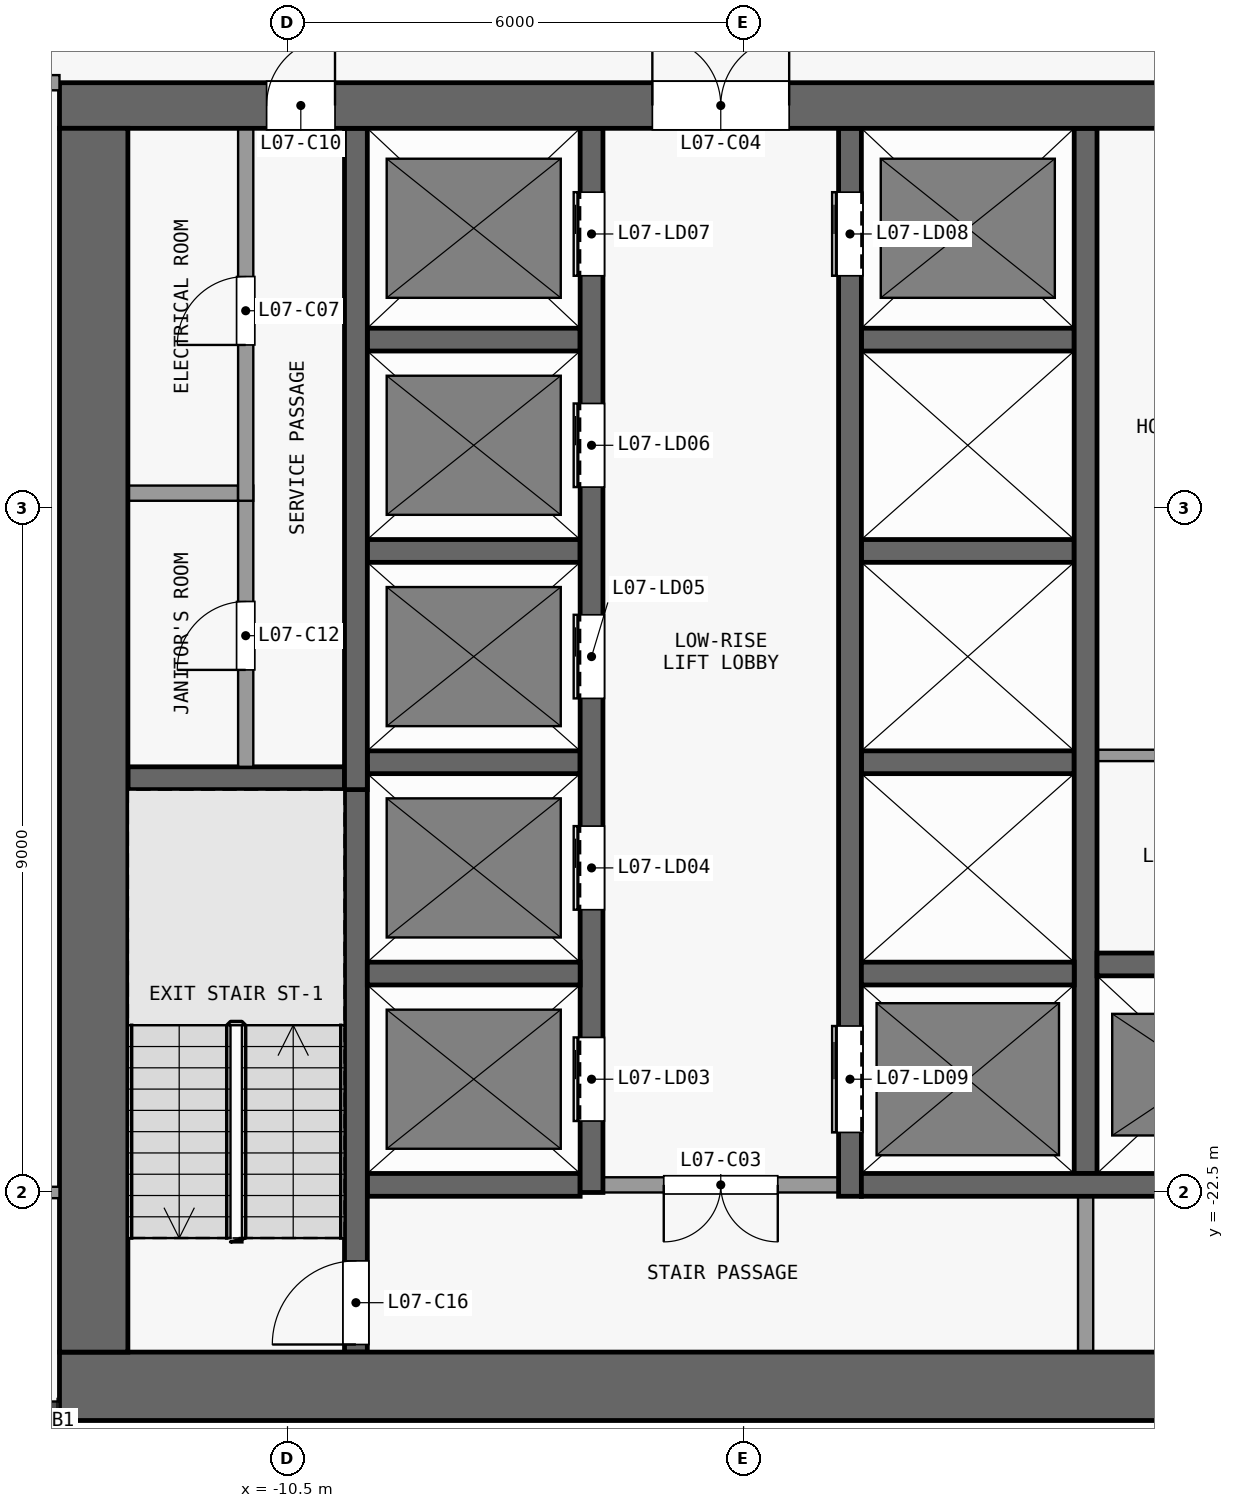
"""IFC4 building model, lengths in metres.
Left out: names, types, materials, properties, quantities, classifications, styles, units other than length and angle.
Written with IfcOpenShell. Run it as: python <this file> out.ifc"""

import sys

from ifc_helpers import new_model, si_unit, direction, frame, frame_2d, origin, place, context, subcontext, project, spatial, rectangle, extrude, element, fill, save


model = new_model("IFC4")
c1 = context("Model", 3, precision=1e-05, world=origin(), true_north=direction((0.0, 1.0)))
c2 = subcontext(c1, "Body", "Model", "MODEL_VIEW")
j1 = project(units=[si_unit("LENGTHUNIT", "METRE"), si_unit("PLANEANGLEUNIT", "RADIAN")], contexts=[c1])
p1 = place(None, origin())
s1 = spatial("IfcSite", under=j1, at=p1, CompositionType="ELEMENT")
p2 = place(p1, origin())
s2 = spatial("IfcBuilding", under=s1, at=p2, CompositionType="ELEMENT")
p3 = place(p2, frame((0.0, 0.0, 36.1)))
s3 = spatial("IfcBuildingStorey", under=s2, at=p3, CompositionType="ELEMENT", Elevation=36.1)
p4 = place(p3, frame((-13.5, -25.05, 0.0), z_axis=(0.0, 0.0, 1.0), x_axis=(1.0, 0.0, 0.0)))
e1 = element("IfcWall", 1, at=p4, inside=s3, PredefinedType="SHEAR", context=c2, shape_type="SweptSolid", body=[
    extrude(rectangle(XDim=27.0, YDim=0.9, at=frame_2d((13.5, 0.0))), origin(), (0.0, 0.0, 1.0), 3.3),
])
p5 = place(p3, frame((-13.5, -8.2, 0.0), z_axis=(0.0, 0.0, 1.0), x_axis=(1.0, 0.0, 0.0)))
e2 = element("IfcWall", 2, at=p5, inside=s3, PredefinedType="SHEAR", context=c2, shape_type="SweptSolid", body=[
    extrude(rectangle(XDim=27.0, YDim=0.6, at=frame_2d((13.5, 0.0))), origin(), (0.0, 0.0, 1.0), 3.3),
])
p6 = place(p5, frame((7.8, 0.0, 0.0)))
e3 = element("IfcOpeningElement", 3, at=p6, cuts=e2, PredefinedType="OPENING", context=c2, shape_type="SweptSolid", body=[
    extrude(rectangle(XDim=1.8, YDim=2.1, at=frame_2d((0.9, 1.05))), frame((0.0, 0.31, 0.0), z_axis=(0.0, -1.0, 0.0), x_axis=(1.0, 0.0, 0.0)), (0.0, 0.0, 1.0), 0.62),
])
p7 = place(p5, frame((17.4, 0.0, 0.0)))
e4 = element("IfcOpeningElement", 4, at=p7, cuts=e2, PredefinedType="OPENING", context=c2, shape_type="SweptSolid", body=[
    extrude(rectangle(XDim=1.8, YDim=2.1, at=frame_2d((0.9, 1.05))), frame((0.0, 0.31, 0.0), z_axis=(0.0, -1.0, 0.0), x_axis=(1.0, 0.0, 0.0)), (0.0, 0.0, 1.0), 0.62),
])
p8 = place(p5, frame((2.725, 0.0, 0.0)))
e5 = element("IfcOpeningElement", 5, at=p8, cuts=e2, PredefinedType="OPENING", context=c2, shape_type="SweptSolid", body=[
    extrude(rectangle(XDim=0.9, YDim=2.1, at=frame_2d((0.45, 1.05))), frame((0.0, 0.31, 0.0), z_axis=(0.0, -1.0, 0.0), x_axis=(1.0, 0.0, 0.0)), (0.0, 0.0, 1.0), 0.62),
])
p9 = place(p5, frame((23.375, 0.0, 0.0)))
e6 = element("IfcOpeningElement", 6, at=p9, cuts=e2, PredefinedType="OPENING", context=c2, shape_type="SweptSolid", body=[
    extrude(rectangle(XDim=0.9, YDim=2.1, at=frame_2d((0.45, 1.05))), frame((0.0, 0.31, 0.0), z_axis=(0.0, -1.0, 0.0), x_axis=(1.0, 0.0, 0.0)), (0.0, 0.0, 1.0), 0.62),
])
p10 = place(p3, frame((-13.05, -24.6, 0.0), z_axis=(0.0, 0.0, 1.0), x_axis=(0.0, 1.0, 0.0)))
e7 = element("IfcWall", 7, at=p10, inside=s3, PredefinedType="SHEAR", context=c2, shape_type="SweptSolid", body=[
    extrude(rectangle(XDim=16.1, YDim=0.9, at=frame_2d((8.05, 0.0))), origin(), (0.0, 0.0, 1.0), 3.3),
])
p11 = place(p3, frame((-9.45, -22.4, 0.0), z_axis=(0.0, 0.0, 1.0), x_axis=(1.0, 0.0, 0.0)))
e8 = element("IfcWall", 8, at=p11, inside=s3, PredefinedType="SHEAR", context=c2, shape_type="SweptSolid", body=[
    extrude(rectangle(XDim=2.8, YDim=0.3, at=frame_2d((1.4, 0.0))), origin(), (0.0, 0.0, 1.0), 3.3),
])
p12 = place(p3, frame((-3.25, -22.4, 0.0), z_axis=(0.0, 0.0, 1.0), x_axis=(-1.0, 0.0, 0.0)))
e9 = element("IfcWall", 9, at=p12, inside=s3, PredefinedType="PARTITIONING", context=c2, shape_type="SweptSolid", body=[
    extrude(rectangle(XDim=3.1, YDim=0.2, at=frame_2d((1.55, 0.0))), origin(), (0.0, 0.0, 1.0), 3.3),
])
p13 = place(p12, frame((0.8, 0.0, 0.0)))
e10 = element("IfcOpeningElement", 10, at=p13, cuts=e9, PredefinedType="OPENING", context=c2, shape_type="SweptSolid", body=[
    extrude(rectangle(XDim=1.5, YDim=2.1, at=frame_2d((0.75, 1.05))), frame((0.0, 0.11, 0.0), z_axis=(0.0, -1.0, 0.0), x_axis=(1.0, 0.0, 0.0)), (0.0, 0.0, 1.0), 0.22),
])
p14 = place(p3, frame((-2.95, -22.4, 0.0), z_axis=(0.0, 0.0, 1.0), x_axis=(1.0, 0.0, 0.0)))
e11 = element("IfcWall", 11, at=p14, inside=s3, PredefinedType="SHEAR", context=c2, shape_type="SweptSolid", body=[
    extrude(rectangle(XDim=6.2, YDim=0.3, at=frame_2d((3.1, 0.0))), origin(), (0.0, 0.0, 1.0), 3.3),
])
for number, where, z_axis, x_axis in (
    (12, (-9.45, -19.62, 0.0), (0.0, 0.0, 1.0), (1.0, 0.0, 0.0)),
    (13, (-2.95, -19.62, 0.0), (0.0, 0.0, 1.0), (1.0, 0.0, 0.0)),
):
    element("IfcWall", number, at=place(p3, frame(where, z_axis=z_axis, x_axis=x_axis)), inside=s3, PredefinedType="SHEAR", context=c2, shape_type="SweptSolid", body=[
        extrude(rectangle(XDim=2.8, YDim=0.3, at=frame_2d((1.4, 0.0))), origin(), (0.0, 0.0, 1.0), 3.3),
    ])
p15 = place(p3, frame((0.15, -19.5, 0.0), z_axis=(0.0, 0.0, 1.0), x_axis=(1.0, 0.0, 0.0)))
e14 = element("IfcWall", 14, at=p15, inside=s3, PredefinedType="SHEAR", context=c2, shape_type="SweptSolid", body=[
    extrude(rectangle(XDim=3.025, YDim=0.3, at=frame_2d((1.513, 0.0))), origin(), (0.0, 0.0, 1.0), 3.3),
])
p16 = place(p3, frame((-12.6, -17.05, 0.0), z_axis=(0.0, 0.0, 1.0), x_axis=(1.0, 0.0, 0.0)))
e15 = element("IfcWall", 15, at=p16, inside=s3, PredefinedType="SHEAR", context=c2, shape_type="SweptSolid", body=[
    extrude(rectangle(XDim=2.85, YDim=0.3, at=frame_2d((1.425, 0.0))), origin(), (0.0, 0.0, 1.0), 3.3),
])
for number, where, z_axis, x_axis in (
    (16, (-9.45, -16.84, 0.0), (0.0, 0.0, 1.0), (1.0, 0.0, 0.0)),
    (17, (-2.95, -16.84, 0.0), (0.0, 0.0, 1.0), (1.0, 0.0, 0.0)),
):
    element("IfcWall", number, at=place(p3, frame(where, z_axis=z_axis, x_axis=x_axis)), inside=s3, PredefinedType="SHEAR", context=c2, shape_type="SweptSolid", body=[
        extrude(rectangle(XDim=2.8, YDim=0.3, at=frame_2d((1.4, 0.0))), origin(), (0.0, 0.0, 1.0), 3.3),
    ])
p17 = place(p3, frame((0.15, -16.75, 0.0), z_axis=(0.0, 0.0, 1.0), x_axis=(1.0, 0.0, 0.0)))
e18 = element("IfcWall", 18, at=p17, inside=s3, PredefinedType="PARTITIONING", context=c2, shape_type="SweptSolid", body=[
    extrude(rectangle(XDim=2.875, YDim=0.15, at=frame_2d((1.438, 0.0))), origin(), (0.0, 0.0, 1.0), 3.3),
])
for number, where, z_axis, x_axis in (
    (19, (-9.45, -14.06, 0.0), (0.0, 0.0, 1.0), (1.0, 0.0, 0.0)),
    (20, (-2.95, -14.06, 0.0), (0.0, 0.0, 1.0), (1.0, 0.0, 0.0)),
):
    element("IfcWall", number, at=place(p3, frame(where, z_axis=z_axis, x_axis=x_axis)), inside=s3, PredefinedType="SHEAR", context=c2, shape_type="SweptSolid", body=[
        extrude(rectangle(XDim=2.8, YDim=0.3, at=frame_2d((1.4, 0.0))), origin(), (0.0, 0.0, 1.0), 3.3),
    ])
p18 = place(p3, frame((-12.6, -13.3, 0.0), z_axis=(0.0, 0.0, 1.0), x_axis=(1.0, 0.0, 0.0)))
e21 = element("IfcWall", 21, at=p18, inside=s3, PredefinedType="PARTITIONING", context=c2, shape_type="SweptSolid", body=[
    extrude(rectangle(XDim=1.45, YDim=0.2, at=frame_2d((0.725, 0.0))), origin(), (0.0, 0.0, 1.0), 3.3),
])
for number, where, z_axis, x_axis in (
    (22, (-9.45, -11.28, 0.0), (0.0, 0.0, 1.0), (1.0, 0.0, 0.0)),
    (23, (-2.95, -11.28, 0.0), (0.0, 0.0, 1.0), (1.0, 0.0, 0.0)),
):
    element("IfcWall", number, at=place(p3, frame(where, z_axis=z_axis, x_axis=x_axis)), inside=s3, PredefinedType="SHEAR", context=c2, shape_type="SweptSolid", body=[
        extrude(rectangle(XDim=2.8, YDim=0.3, at=frame_2d((1.4, 0.0))), origin(), (0.0, 0.0, 1.0), 3.3),
    ])
p19 = place(p3, frame((-11.05, -16.9, 0.0), z_axis=(0.0, 0.0, 1.0), x_axis=(0.0, 1.0, 0.0)))
e24 = element("IfcWall", 24, at=p19, inside=s3, PredefinedType="PARTITIONING", context=c2, shape_type="SweptSolid", body=[
    extrude(rectangle(XDim=3.7, YDim=0.2, at=frame_2d((1.85, 0.0))), origin(), (0.0, 0.0, 1.0), 3.3),
])
p20 = place(p19, frame((1.275, 0.0, 0.0)))
e25 = element("IfcOpeningElement", 25, at=p20, cuts=e24, PredefinedType="OPENING", context=c2, shape_type="SweptSolid", body=[
    extrude(rectangle(XDim=0.9, YDim=2.1, at=frame_2d((0.45, 1.05))), frame((0.0, 0.11, 0.0), z_axis=(0.0, -1.0, 0.0), x_axis=(1.0, 0.0, 0.0)), (0.0, 0.0, 1.0), 0.22),
])
p21 = place(p3, frame((-11.05, -13.4, 0.0), z_axis=(0.0, 0.0, 1.0), x_axis=(0.0, 1.0, 0.0)))
e26 = element("IfcWall", 26, at=p21, inside=s3, PredefinedType="PARTITIONING", context=c2, shape_type="SweptSolid", body=[
    extrude(rectangle(XDim=4.9, YDim=0.2, at=frame_2d((2.45, 0.0))), origin(), (0.0, 0.0, 1.0), 3.3),
])
p22 = place(p21, frame((2.05, 0.0, 0.0)))
e27 = element("IfcOpeningElement", 27, at=p22, cuts=e26, PredefinedType="OPENING", context=c2, shape_type="SweptSolid", body=[
    extrude(rectangle(XDim=0.9, YDim=2.1, at=frame_2d((0.45, 1.05))), frame((0.0, 0.11, 0.0), z_axis=(0.0, -1.0, 0.0), x_axis=(1.0, 0.0, 0.0)), (0.0, 0.0, 1.0), 0.22),
])
p23 = place(p3, frame((-9.6, -24.6, 0.0), z_axis=(0.0, 0.0, 1.0), x_axis=(0.0, 1.0, 0.0)))
e28 = element("IfcWall", 28, at=p23, inside=s3, PredefinedType="SHEAR", context=c2, shape_type="SweptSolid", body=[
    extrude(rectangle(XDim=7.7, YDim=0.3, at=frame_2d((3.85, 0.0))), origin(), (0.0, 0.0, 1.0), 3.3),
])
p24 = place(p23, frame((0.1, 0.0, 0.0)))
e29 = element("IfcOpeningElement", 29, at=p24, cuts=e28, PredefinedType="OPENING", context=c2, shape_type="SweptSolid", body=[
    extrude(rectangle(XDim=1.1, YDim=2.1, at=frame_2d((0.55, 1.05))), frame((0.0, 0.16, 0.0), z_axis=(0.0, -1.0, 0.0), x_axis=(1.0, 0.0, 0.0)), (0.0, 0.0, 1.0), 0.32),
])
p25 = place(p3, frame((-9.6, -17.2, 0.0), z_axis=(0.0, 0.0, 1.0), x_axis=(0.0, 1.0, 0.0)))
e30 = element("IfcWall", 30, at=p25, inside=s3, PredefinedType="SHEAR", context=c2, shape_type="SweptSolid", body=[
    extrude(rectangle(XDim=8.7, YDim=0.3, at=frame_2d((4.35, 0.0))), origin(), (0.0, 0.0, 1.0), 3.3),
])
p26 = place(p3, frame((-6.5, -22.5, 0.0), z_axis=(0.0, 0.0, 1.0), x_axis=(0.0, 1.0, 0.0)))
e31 = element("IfcWall", 31, at=p26, inside=s3, PredefinedType="SHEAR", context=c2, shape_type="SweptSolid", body=[
    extrude(rectangle(XDim=14.0, YDim=0.3, at=frame_2d((7.0, 0.0))), origin(), (0.0, 0.0, 1.0), 3.3),
])
p27 = place(p26, frame((0.94, 0.0, 0.0)))
e32 = element("IfcOpeningElement", 32, at=p27, cuts=e31, PredefinedType="OPENING", context=c2, shape_type="SweptSolid", body=[
    extrude(rectangle(XDim=1.1, YDim=2.1, at=frame_2d((0.55, 1.05))), frame((0.0, 0.16, 0.0), z_axis=(0.0, -1.0, 0.0), x_axis=(1.0, 0.0, 0.0)), (0.0, 0.0, 1.0), 0.32),
])
p28 = place(p26, frame((3.72, 0.0, 0.0)))
e33 = element("IfcOpeningElement", 33, at=p28, cuts=e31, PredefinedType="OPENING", context=c2, shape_type="SweptSolid", body=[
    extrude(rectangle(XDim=1.1, YDim=2.1, at=frame_2d((0.55, 1.05))), frame((0.0, 0.16, 0.0), z_axis=(0.0, -1.0, 0.0), x_axis=(1.0, 0.0, 0.0)), (0.0, 0.0, 1.0), 0.32),
])
p29 = place(p26, frame((6.5, 0.0, 0.0)))
e34 = element("IfcOpeningElement", 34, at=p29, cuts=e31, PredefinedType="OPENING", context=c2, shape_type="SweptSolid", body=[
    extrude(rectangle(XDim=1.1, YDim=2.1, at=frame_2d((0.55, 1.05))), frame((0.0, 0.16, 0.0), z_axis=(0.0, -1.0, 0.0), x_axis=(1.0, 0.0, 0.0)), (0.0, 0.0, 1.0), 0.32),
])
p30 = place(p26, frame((9.28, 0.0, 0.0)))
e35 = element("IfcOpeningElement", 35, at=p30, cuts=e31, PredefinedType="OPENING", context=c2, shape_type="SweptSolid", body=[
    extrude(rectangle(XDim=1.1, YDim=2.1, at=frame_2d((0.55, 1.05))), frame((0.0, 0.16, 0.0), z_axis=(0.0, -1.0, 0.0), x_axis=(1.0, 0.0, 0.0)), (0.0, 0.0, 1.0), 0.32),
])
p31 = place(p26, frame((12.06, 0.0, 0.0)))
e36 = element("IfcOpeningElement", 36, at=p31, cuts=e31, PredefinedType="OPENING", context=c2, shape_type="SweptSolid", body=[
    extrude(rectangle(XDim=1.1, YDim=2.1, at=frame_2d((0.55, 1.05))), frame((0.0, 0.16, 0.0), z_axis=(0.0, -1.0, 0.0), x_axis=(1.0, 0.0, 0.0)), (0.0, 0.0, 1.0), 0.32),
])
p32 = place(p3, frame((-3.1, -22.55, 0.0), z_axis=(0.0, 0.0, 1.0), x_axis=(0.0, 1.0, 0.0)))
e37 = element("IfcWall", 37, at=p32, inside=s3, PredefinedType="SHEAR", context=c2, shape_type="SweptSolid", body=[
    extrude(rectangle(XDim=14.05, YDim=0.3, at=frame_2d((7.025, 0.0))), origin(), (0.0, 0.0, 1.0), 3.3),
])
p33 = place(p32, frame((12.11, 0.0, 0.0)))
e38 = element("IfcOpeningElement", 38, at=p33, cuts=e37, PredefinedType="OPENING", context=c2, shape_type="SweptSolid", body=[
    extrude(rectangle(XDim=1.1, YDim=2.1, at=frame_2d((0.55, 1.05))), frame((0.0, 0.16, 0.0), z_axis=(0.0, -1.0, 0.0), x_axis=(1.0, 0.0, 0.0)), (0.0, 0.0, 1.0), 0.32),
])
p34 = place(p32, frame((0.84, 0.0, 0.0)))
e39 = element("IfcOpeningElement", 39, at=p34, cuts=e37, PredefinedType="OPENING", context=c2, shape_type="SweptSolid", body=[
    extrude(rectangle(XDim=1.4, YDim=2.1, at=frame_2d((0.7, 1.05))), frame((0.0, 0.16, 0.0), z_axis=(0.0, -1.0, 0.0), x_axis=(1.0, 0.0, 0.0)), (0.0, 0.0, 1.0), 0.32),
])
p35 = place(p3, frame((0.0, -24.6, 0.0), z_axis=(0.0, 0.0, 1.0), x_axis=(0.0, 1.0, 0.0)))
e40 = element("IfcWall", 40, at=p35, inside=s3, PredefinedType="PARTITIONING", context=c2, shape_type="SweptSolid", body=[
    extrude(rectangle(XDim=2.05, YDim=0.2, at=frame_2d((1.025, 0.0))), origin(), (0.0, 0.0, 1.0), 3.3),
])
p36 = place(p3, frame((0.0, -22.25, 0.0), z_axis=(0.0, 0.0, 1.0), x_axis=(0.0, 1.0, 0.0)))
e41 = element("IfcWall", 41, at=p36, inside=s3, PredefinedType="SHEAR", context=c2, shape_type="SweptSolid", body=[
    extrude(rectangle(XDim=13.75, YDim=0.3, at=frame_2d((6.875, 0.0))), origin(), (0.0, 0.0, 1.0), 3.3),
])
p37 = place(p3, frame((-16.425, -22.5, 0.0), z_axis=(0.0, 0.0, 1.0), x_axis=(1.0, 0.0, 0.0)))
e42 = element("IfcWall", 42, at=p37, inside=s3, PredefinedType="PARTITIONING", context=c2, shape_type="SweptSolid", body=[
    extrude(rectangle(XDim=2.925, YDim=0.15, at=frame_2d((1.462, 0.0))), origin(), (0.0, 0.0, 1.0), 3.3),
])
p38 = place(p37, frame((1.0, 0.0, 0.0)))
e43 = element("IfcOpeningElement", 43, at=p38, cuts=e42, PredefinedType="OPENING", context=c2, shape_type="SweptSolid", body=[
    extrude(rectangle(XDim=0.9, YDim=2.1, at=frame_2d((0.45, 1.05))), frame((0.0, 0.085, 0.0), z_axis=(0.0, -1.0, 0.0), x_axis=(1.0, 0.0, 0.0)), (0.0, 0.0, 1.0), 0.17),
])
p39 = place(p3, frame((-25.25, -7.9, 0.0), z_axis=(0.0, 0.0, 1.0), x_axis=(1.0, 0.0, 0.0)))
e44 = element("IfcWall", 44, at=p39, inside=s3, PredefinedType="PARTITIONING", context=c2, shape_type="SweptSolid", body=[
    extrude(rectangle(XDim=11.75, YDim=0.2, at=frame_2d((5.875, 0.0))), origin(), (0.0, 0.0, 1.0), 3.3),
])
p40 = place(p39, frame((9.75, 0.0, 0.0)))
e45 = element("IfcOpeningElement", 45, at=p40, cuts=e44, PredefinedType="OPENING", context=c2, shape_type="SweptSolid", body=[
    extrude(rectangle(XDim=1.0, YDim=2.1, at=frame_2d((0.5, 1.05))), frame((0.0, 0.11, 0.0), z_axis=(0.0, -1.0, 0.0), x_axis=(1.0, 0.0, 0.0)), (0.0, 0.0, 1.0), 0.22),
])
p41 = place(p27, origin())
e46 = element("IfcDoor", 46, at=p41, inside=s3, OperationType="DOUBLE_DOOR_SLIDING", PredefinedType="DOOR", context=c2, shape_type="SweptSolid", body=[
    extrude(rectangle(XDim=1.1, YDim=2.1, at=frame_2d((0.55, 1.05))), frame((0.0, 0.025, 0.0), z_axis=(0.0, -1.0, 0.0), x_axis=(1.0, 0.0, 0.0)), (0.0, 0.0, 1.0), 0.05),
])
fill(e32, e46)
p42 = place(p28, origin())
e47 = element("IfcDoor", 47, at=p42, inside=s3, OperationType="DOUBLE_DOOR_SLIDING", PredefinedType="DOOR", context=c2, shape_type="SweptSolid", body=[
    extrude(rectangle(XDim=1.1, YDim=2.1, at=frame_2d((0.55, 1.05))), frame((0.0, 0.025, 0.0), z_axis=(0.0, -1.0, 0.0), x_axis=(1.0, 0.0, 0.0)), (0.0, 0.0, 1.0), 0.05),
])
fill(e33, e47)
p43 = place(p29, origin())
e48 = element("IfcDoor", 48, at=p43, inside=s3, OperationType="DOUBLE_DOOR_SLIDING", PredefinedType="DOOR", context=c2, shape_type="SweptSolid", body=[
    extrude(rectangle(XDim=1.1, YDim=2.1, at=frame_2d((0.55, 1.05))), frame((0.0, 0.025, 0.0), z_axis=(0.0, -1.0, 0.0), x_axis=(1.0, 0.0, 0.0)), (0.0, 0.0, 1.0), 0.05),
])
fill(e34, e48)
p44 = place(p30, origin())
e49 = element("IfcDoor", 49, at=p44, inside=s3, OperationType="DOUBLE_DOOR_SLIDING", PredefinedType="DOOR", context=c2, shape_type="SweptSolid", body=[
    extrude(rectangle(XDim=1.1, YDim=2.1, at=frame_2d((0.55, 1.05))), frame((0.0, 0.025, 0.0), z_axis=(0.0, -1.0, 0.0), x_axis=(1.0, 0.0, 0.0)), (0.0, 0.0, 1.0), 0.05),
])
fill(e35, e49)
p45 = place(p31, origin())
e50 = element("IfcDoor", 50, at=p45, inside=s3, OperationType="DOUBLE_DOOR_SLIDING", PredefinedType="DOOR", context=c2, shape_type="SweptSolid", body=[
    extrude(rectangle(XDim=1.1, YDim=2.1, at=frame_2d((0.55, 1.05))), frame((0.0, 0.025, 0.0), z_axis=(0.0, -1.0, 0.0), x_axis=(1.0, 0.0, 0.0)), (0.0, 0.0, 1.0), 0.05),
])
fill(e36, e50)
p46 = place(p33, origin())
e51 = element("IfcDoor", 51, at=p46, inside=s3, OperationType="DOUBLE_DOOR_SLIDING", PredefinedType="DOOR", context=c2, shape_type="SweptSolid", body=[
    extrude(rectangle(XDim=1.1, YDim=2.1, at=frame_2d((0.55, 1.05))), frame((0.0, 0.025, 0.0), z_axis=(0.0, -1.0, 0.0), x_axis=(1.0, 0.0, 0.0)), (0.0, 0.0, 1.0), 0.05),
])
fill(e38, e51)
p47 = place(p34, origin())
e52 = element("IfcDoor", 52, at=p47, inside=s3, OperationType="DOUBLE_DOOR_SLIDING", PredefinedType="DOOR", context=c2, shape_type="SweptSolid", body=[
    extrude(rectangle(XDim=1.4, YDim=2.1, at=frame_2d((0.7, 1.05))), frame((0.0, 0.025, 0.0), z_axis=(0.0, -1.0, 0.0), x_axis=(1.0, 0.0, 0.0)), (0.0, 0.0, 1.0), 0.05),
])
fill(e39, e52)
p48 = place(p13, origin())
e53 = element("IfcDoor", 53, at=p48, inside=s3, OperationType="DOUBLE_DOOR_SINGLE_SWING", PredefinedType="DOOR", context=c2, shape_type="SweptSolid", body=[
    extrude(rectangle(XDim=1.5, YDim=2.1, at=frame_2d((0.75, 1.05))), frame((0.0, 0.025, 0.0), z_axis=(0.0, -1.0, 0.0), x_axis=(1.0, 0.0, 0.0)), (0.0, 0.0, 1.0), 0.05),
])
fill(e10, e53)
p49 = place(p6, origin())
e54 = element("IfcDoor", 54, at=p49, inside=s3, OperationType="DOUBLE_DOOR_SINGLE_SWING", PredefinedType="DOOR", context=c2, shape_type="SweptSolid", body=[
    extrude(rectangle(XDim=1.8, YDim=2.1, at=frame_2d((0.9, 1.05))), frame((0.0, 0.025, 0.0), z_axis=(0.0, -1.0, 0.0), x_axis=(1.0, 0.0, 0.0)), (0.0, 0.0, 1.0), 0.05),
])
fill(e3, e54)
p50 = place(p22, origin())
e55 = element("IfcDoor", 55, at=p50, inside=s3, OperationType="SINGLE_SWING_LEFT", PredefinedType="DOOR", context=c2, shape_type="SweptSolid", body=[
    extrude(rectangle(XDim=0.9, YDim=2.1, at=frame_2d((0.45, 1.05))), frame((0.0, 0.025, 0.0), z_axis=(0.0, -1.0, 0.0), x_axis=(1.0, 0.0, 0.0)), (0.0, 0.0, 1.0), 0.05),
])
fill(e27, e55)
p51 = place(p8, origin())
e56 = element("IfcDoor", 56, at=p51, inside=s3, OperationType="SINGLE_SWING_RIGHT", PredefinedType="DOOR", context=c2, shape_type="SweptSolid", body=[
    extrude(rectangle(XDim=0.9, YDim=2.1, at=frame_2d((0.45, 1.05))), frame((0.0, 0.025, 0.0), z_axis=(0.0, -1.0, 0.0), x_axis=(1.0, 0.0, 0.0)), (0.0, 0.0, 1.0), 0.05),
])
fill(e5, e56)
p52 = place(p20, origin())
e57 = element("IfcDoor", 57, at=p52, inside=s3, OperationType="SINGLE_SWING_LEFT", PredefinedType="DOOR", context=c2, shape_type="SweptSolid", body=[
    extrude(rectangle(XDim=0.9, YDim=2.1, at=frame_2d((0.45, 1.05))), frame((0.0, 0.025, 0.0), z_axis=(0.0, -1.0, 0.0), x_axis=(1.0, 0.0, 0.0)), (0.0, 0.0, 1.0), 0.05),
])
fill(e25, e57)
p53 = place(p24, origin())
e58 = element("IfcDoor", 58, at=p53, inside=s3, OperationType="SINGLE_SWING_LEFT", PredefinedType="DOOR", context=c2, shape_type="SweptSolid", body=[
    extrude(rectangle(XDim=1.1, YDim=2.1, at=frame_2d((0.55, 1.05))), frame((0.0, 0.025, 0.0), z_axis=(0.0, -1.0, 0.0), x_axis=(1.0, 0.0, 0.0)), (0.0, 0.0, 1.0), 0.05),
])
fill(e29, e58)
save(model, sys.argv[1])
